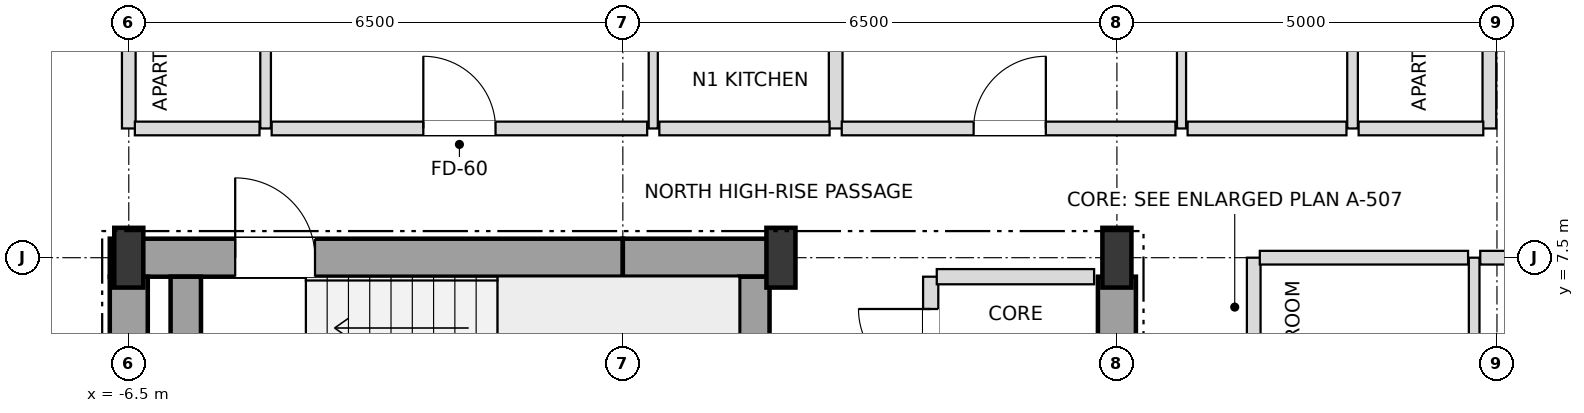
"""IFC4 building model, lengths in metres.
Left out: names, types, materials, properties, quantities, classifications, styles, units other than length and angle.
Written with IfcOpenShell. Run it as: python <this file> out.ifc"""

import sys

from ifc_helpers import new_model, si_unit, direction, frame, frame_2d, origin, origin_2d, place, context, subcontext, project, spatial, rectangle, i_section, extrude, element, fill, save


model = new_model("IFC4")
c1 = context("Model", 3, precision=1e-05, world=origin(), true_north=direction((0.0, 1.0)))
c2 = subcontext(c1, "Body", "Model", "MODEL_VIEW")
j1 = project(units=[si_unit("LENGTHUNIT", "METRE"), si_unit("PLANEANGLEUNIT", "RADIAN")], contexts=[c1])
p1 = place(None, origin())
s1 = spatial("IfcSite", under=j1, at=p1, CompositionType="ELEMENT")
p2 = place(p1, origin())
s2 = spatial("IfcBuilding", under=s1, at=p2, CompositionType="ELEMENT")
p3 = place(p2, frame((0.0, 0.0, 233.1)))
s3 = spatial("IfcBuildingStorey", under=s2, at=p3, CompositionType="ELEMENT", Elevation=233.1)
for number, where, z_axis, x_axis in (
    (1, (-6.5, 7.5, 0.0), (0.0, 0.0, 1.0), (1.0, 0.0, 0.0)),
    (2, (2.08, 7.5, 0.0), (0.0, 0.0, 1.0), (1.0, 0.0, 0.0)),
    (3, (6.5, 7.5, 0.0), (0.0, 0.0, 1.0), (1.0, 0.0, 0.0)),
):
    element("IfcColumn", number, at=place(p3, frame(where, z_axis=z_axis, x_axis=x_axis)), inside=s3, PredefinedType="COLUMN", context=c2, shape_type="SweptSolid", body=[
        extrude(i_section(OverallWidth=0.382, OverallDepth=0.786, WebThickness=0.02, FlangeThickness=0.033, at=origin_2d()), origin(), (0.0, 0.0, 1.0), 3.6),
    ])
p4 = place(p3, frame((-6.75, 7.5, 0.0), z_axis=(0.0, 0.0, 1.0), x_axis=(1.0, 0.0, 0.0)))
e4 = element("IfcWall", 4, at=p4, inside=s3, PredefinedType="SHEAR", context=c2, shape_type="SweptSolid", body=[
    extrude(rectangle(XDim=6.75, YDim=0.5, at=frame_2d((3.375, 0.0))), origin(), (0.0, 0.0, 1.0), 3.38),
])
p5 = place(p4, frame((1.65, 0.0, 0.0)))
e5 = element("IfcOpeningElement", 5, at=p5, cuts=e4, PredefinedType="OPENING", context=c2, shape_type="SweptSolid", body=[
    extrude(rectangle(XDim=1.05, YDim=2.15, at=frame_2d((0.525, 1.075))), frame((0.0, 0.26, 0.0), z_axis=(0.0, -1.0, 0.0), x_axis=(1.0, 0.0, 0.0)), (0.0, 0.0, 1.0), 0.52),
])
p6 = place(p3, frame((0.0, 7.5, 0.0), z_axis=(0.0, 0.0, 1.0), x_axis=(1.0, 0.0, 0.0)))
e6 = element("IfcWall", 6, at=p6, inside=s3, PredefinedType="SHEAR", context=c2, shape_type="SweptSolid", body=[
    extrude(rectangle(XDim=2.08, YDim=0.5, at=frame_2d((1.04, 0.0))), origin(), (0.0, 0.0, 1.0), 3.38),
])
for number, where, z_axis, x_axis in (
    (7, (-6.5, 3.95, 0.0), (0.0, 0.0, 1.0), (0.0, 1.0, 0.0)),
    (8, (6.5, 3.95, 0.0), (0.0, 0.0, 1.0), (0.0, 1.0, 0.0)),
):
    element("IfcWall", number, at=place(p3, frame(where, z_axis=z_axis, x_axis=x_axis)), inside=s3, PredefinedType="SHEAR", context=c2, shape_type="SweptSolid", body=[
        extrude(rectangle(XDim=3.3, YDim=0.5, at=frame_2d((1.65, 0.0))), origin(), (0.0, 0.0, 1.0), 3.38),
    ])
for number, where, z_axis, x_axis in (
    (9, (1.73, 3.95, 0.0), (0.0, 0.0, 1.0), (0.0, 1.0, 0.0)),
    (10, (-5.75, 3.95, 0.0), (0.0, 0.0, 1.0), (0.0, 1.0, 0.0)),
):
    element("IfcWall", number, at=place(p3, frame(where, z_axis=z_axis, x_axis=x_axis)), inside=s3, PredefinedType="SHEAR", context=c2, shape_type="SweptSolid", body=[
        extrude(rectangle(XDim=3.3, YDim=0.4, at=frame_2d((1.65, 0.0))), origin(), (0.0, 0.0, 1.0), 3.38),
    ])
p7 = place(p3, frame((-6.5, 9.2, 0.0), z_axis=(0.0, 0.0, 1.0), x_axis=(0.0, 1.0, 0.0)))
e11 = element("IfcWall", 11, at=p7, inside=s3, PredefinedType="PARTITIONING", context=c2, shape_type="SweptSolid", body=[
    extrude(rectangle(XDim=10.7, YDim=0.18, at=frame_2d((5.35, 0.0))), origin(), (0.0, 0.0, 1.0), 2.826),
])
p8 = place(p3, frame((-4.7, 9.2, 0.0), z_axis=(0.0, 0.0, 1.0), x_axis=(0.0, 1.0, 0.0)))
e12 = element("IfcWall", 12, at=p8, inside=s3, PredefinedType="PARTITIONING", context=c2, shape_type="SweptSolid", body=[
    extrude(rectangle(XDim=4.7, YDim=0.14, at=frame_2d((2.35, 0.0))), origin(), (0.0, 0.0, 1.0), 3.38),
])
p9 = place(p8, frame((1.9, 0.0, 0.0)))
e13 = element("IfcOpeningElement", 13, at=p9, cuts=e12, PredefinedType="OPENING", context=c2, shape_type="SweptSolid", body=[
    extrude(rectangle(XDim=0.9, YDim=2.1, at=frame_2d((0.45, 1.05))), frame((0.0, 0.08, 0.0), z_axis=(0.0, -1.0, 0.0), x_axis=(1.0, 0.0, 0.0)), (0.0, 0.0, 1.0), 0.16),
])
p10 = place(p3, frame((0.4, 9.2, 0.0), z_axis=(0.0, 0.0, 1.0), x_axis=(0.0, 1.0, 0.0)))
e14 = element("IfcWall", 14, at=p10, inside=s3, PredefinedType="PARTITIONING", context=c2, shape_type="SweptSolid", body=[
    extrude(rectangle(XDim=4.7, YDim=0.12, at=frame_2d((2.35, 0.0))), origin(), (0.0, 0.0, 1.0), 3.38),
])
p11 = place(p10, frame((1.875, 0.0, 0.0)))
e15 = element("IfcOpeningElement", 15, at=p11, cuts=e14, PredefinedType="OPENING", context=c2, shape_type="SweptSolid", body=[
    extrude(rectangle(XDim=0.95, YDim=2.1, at=frame_2d((0.475, 1.05))), frame((0.0, 0.07, 0.0), z_axis=(0.0, -1.0, 0.0), x_axis=(1.0, 0.0, 0.0)), (0.0, 0.0, 1.0), 0.14),
])
p12 = place(p3, frame((2.8, 9.2, 0.0), z_axis=(0.0, 0.0, 1.0), x_axis=(0.0, 1.0, 0.0)))
e16 = element("IfcWall", 16, at=p12, inside=s3, PredefinedType="PARTITIONING", context=c2, shape_type="SweptSolid", body=[
    extrude(rectangle(XDim=10.7, YDim=0.18, at=frame_2d((5.35, 0.0))), origin(), (0.0, 0.0, 1.0), 3.018),
])
p13 = place(p3, frame((4.05, 5.55, 0.0), z_axis=(0.0, 0.0, 1.0), x_axis=(0.0, 1.0, 0.0)))
e17 = element("IfcWall", 17, at=p13, inside=s3, PredefinedType="SOLIDWALL", context=c2, shape_type="SweptSolid", body=[
    extrude(rectangle(XDim=1.7, YDim=0.2, at=frame_2d((0.85, 0.0))), origin(), (0.0, 0.0, 1.0), 3.38),
])
p14 = place(p13, frame((0.325, 0.0, 0.0)))
e18 = element("IfcOpeningElement", 18, at=p14, cuts=e17, PredefinedType="OPENING", context=c2, shape_type="SweptSolid", body=[
    extrude(rectangle(XDim=0.95, YDim=2.15, at=frame_2d((0.475, 1.075))), frame((0.0, 0.11, 0.0), z_axis=(0.0, -1.0, 0.0), x_axis=(1.0, 0.0, 0.0)), (0.0, 0.0, 1.0), 0.22),
])
p15 = place(p3, frame((7.35, 9.2, 0.0), z_axis=(0.0, 0.0, 1.0), x_axis=(0.0, 1.0, 0.0)))
e19 = element("IfcWall", 19, at=p15, inside=s3, PredefinedType="PARTITIONING", context=c2, shape_type="SweptSolid", body=[
    extrude(rectangle(XDim=10.7, YDim=0.12, at=frame_2d((5.35, 0.0))), origin(), (0.0, 0.0, 1.0), 2.826),
])
p16 = place(p15, frame((1.875, 0.0, 0.0)))
e20 = element("IfcOpeningElement", 20, at=p16, cuts=e19, PredefinedType="OPENING", context=c2, shape_type="SweptSolid", body=[
    extrude(rectangle(XDim=0.95, YDim=2.1, at=frame_2d((0.475, 1.05))), frame((0.0, 0.07, 0.0), z_axis=(0.0, -1.0, 0.0), x_axis=(1.0, 0.0, 0.0)), (0.0, 0.0, 1.0), 0.14),
])
p17 = place(p15, frame((7.25, 0.0, 0.0)))
e21 = element("IfcOpeningElement", 21, at=p17, cuts=e19, PredefinedType="OPENING", context=c2, shape_type="SweptSolid", body=[
    extrude(rectangle(XDim=0.9, YDim=2.1, at=frame_2d((0.45, 1.05))), frame((0.0, 0.07, 0.0), z_axis=(0.0, -1.0, 0.0), x_axis=(1.0, 0.0, 0.0)), (0.0, 0.0, 1.0), 0.14),
])
p18 = place(p3, frame((8.3, -7.5, 0.0), z_axis=(0.0, 0.0, 1.0), x_axis=(0.0, 1.0, 0.0)))
e22 = element("IfcWall", 22, at=p18, inside=s3, PredefinedType="PARTITIONING", context=c2, shape_type="SweptSolid", body=[
    extrude(rectangle(XDim=15.0, YDim=0.18, at=frame_2d((7.5, 0.0))), origin(), (0.0, 0.0, 1.0), 3.38),
])
p19 = place(p18, frame((2.355, 0.0, 0.0)))
e23 = element("IfcOpeningElement", 23, at=p19, cuts=e22, PredefinedType="OPENING", context=c2, shape_type="SweptSolid", body=[
    extrude(rectangle(XDim=0.95, YDim=2.15, at=frame_2d((0.475, 1.075))), frame((0.0, 0.1, 0.0), z_axis=(0.0, -1.0, 0.0), x_axis=(1.0, 0.0, 0.0)), (0.0, 0.0, 1.0), 0.2),
])
p20 = place(p3, frame((9.6, 9.2, 0.0), z_axis=(0.0, 0.0, 1.0), x_axis=(0.0, 1.0, 0.0)))
e24 = element("IfcWall", 24, at=p20, inside=s3, PredefinedType="PARTITIONING", context=c2, shape_type="SweptSolid", body=[
    extrude(rectangle(XDim=4.7, YDim=0.14, at=frame_2d((2.35, 0.0))), origin(), (0.0, 0.0, 1.0), 2.826),
])
p21 = place(p20, frame((1.9, 0.0, 0.0)))
e25 = element("IfcOpeningElement", 25, at=p21, cuts=e24, PredefinedType="OPENING", context=c2, shape_type="SweptSolid", body=[
    extrude(rectangle(XDim=0.9, YDim=2.1, at=frame_2d((0.45, 1.05))), frame((0.0, 0.08, 0.0), z_axis=(0.0, -1.0, 0.0), x_axis=(1.0, 0.0, 0.0)), (0.0, 0.0, 1.0), 0.16),
])
p22 = place(p3, frame((11.2, -7.5, 0.0), z_axis=(0.0, 0.0, 1.0), x_axis=(0.0, 1.0, 0.0)))
e26 = element("IfcWall", 26, at=p22, inside=s3, PredefinedType="PARTITIONING", context=c2, shape_type="SweptSolid", body=[
    extrude(rectangle(XDim=15.0, YDim=0.14, at=frame_2d((7.5, 0.0))), origin(), (0.0, 0.0, 1.0), 3.38),
])
p23 = place(p22, frame((3.475, 0.0, 0.0)))
e27 = element("IfcOpeningElement", 27, at=p23, cuts=e26, PredefinedType="OPENING", context=c2, shape_type="SweptSolid", body=[
    extrude(rectangle(XDim=0.95, YDim=2.1, at=frame_2d((0.475, 1.05))), frame((0.0, 0.08, 0.0), z_axis=(0.0, -1.0, 0.0), x_axis=(1.0, 0.0, 0.0)), (0.0, 0.0, 1.0), 0.16),
])
p24 = place(p3, frame((11.4, 9.2, 0.0), z_axis=(0.0, 0.0, 1.0), x_axis=(0.0, 1.0, 0.0)))
e28 = element("IfcWall", 28, at=p24, inside=s3, PredefinedType="PARTITIONING", context=c2, shape_type="SweptSolid", body=[
    extrude(rectangle(XDim=5.07, YDim=0.18, at=frame_2d((2.535, 0.0))), origin(), (0.0, 0.0, 1.0), 2.748),
])
p25 = place(p3, frame((4.13, 7.25, 0.0), z_axis=(0.0, 0.0, 1.0), x_axis=(1.0, 0.0, 0.0)))
e29 = element("IfcWall", 29, at=p25, inside=s3, PredefinedType="SOLIDWALL", context=c2, shape_type="SweptSolid", body=[
    extrude(rectangle(XDim=2.07, YDim=0.2, at=frame_2d((1.035, 0.0))), origin(), (0.0, 0.0, 1.0), 3.38),
])
p26 = place(p3, frame((8.38, 7.5, 0.0), z_axis=(0.0, 0.0, 1.0), x_axis=(1.0, 0.0, 0.0)))
e30 = element("IfcWall", 30, at=p26, inside=s3, PredefinedType="PARTITIONING", context=c2, shape_type="SweptSolid", body=[
    extrude(rectangle(XDim=2.74, YDim=0.18, at=frame_2d((1.37, 0.0))), origin(), (0.0, 0.0, 1.0), 2.826),
])
p27 = place(p3, frame((11.28, 7.5, 0.0), z_axis=(0.0, 0.0, 1.0), x_axis=(1.0, 0.0, 0.0)))
e31 = element("IfcWall", 31, at=p27, inside=s3, PredefinedType="PARTITIONING", context=c2, shape_type="SweptSolid", body=[
    extrude(rectangle(XDim=5.62, YDim=0.18, at=frame_2d((2.81, 0.0))), origin(), (0.0, 0.0, 1.0), 2.826),
])
p28 = place(p3, frame((-6.42, 9.2, 0.0), z_axis=(0.0, 0.0, 1.0), x_axis=(1.0, 0.0, 0.0)))
e32 = element("IfcWall", 32, at=p28, inside=s3, PredefinedType="PARTITIONING", context=c2, shape_type="SweptSolid", body=[
    extrude(rectangle(XDim=1.64, YDim=0.18, at=frame_2d((0.82, 0.0))), origin(), (0.0, 0.0, 1.0), 3.38),
])
p29 = place(p3, frame((-4.62, 9.2, 0.0), z_axis=(0.0, 0.0, 1.0), x_axis=(1.0, 0.0, 0.0)))
e33 = element("IfcWall", 33, at=p29, inside=s3, PredefinedType="PARTITIONING", context=c2, shape_type="SweptSolid", body=[
    extrude(rectangle(XDim=4.94, YDim=0.18, at=frame_2d((2.47, 0.0))), origin(), (0.0, 0.0, 1.0), 3.38),
])
p30 = place(p29, frame((1.995, 0.0, 0.0)))
e34 = element("IfcOpeningElement", 34, at=p30, cuts=e33, PredefinedType="OPENING", context=c2, shape_type="SweptSolid", body=[
    extrude(rectangle(XDim=0.95, YDim=2.15, at=frame_2d((0.475, 1.075))), frame((0.0, 0.1, 0.0), z_axis=(0.0, -1.0, 0.0), x_axis=(1.0, 0.0, 0.0)), (0.0, 0.0, 1.0), 0.2),
])
p31 = place(p3, frame((0.48, 9.2, 0.0), z_axis=(0.0, 0.0, 1.0), x_axis=(1.0, 0.0, 0.0)))
e35 = element("IfcWall", 35, at=p31, inside=s3, PredefinedType="PARTITIONING", context=c2, shape_type="SweptSolid", body=[
    extrude(rectangle(XDim=2.24, YDim=0.18, at=frame_2d((1.12, 0.0))), origin(), (0.0, 0.0, 1.0), 3.38),
])
p32 = place(p3, frame((2.88, 9.2, 0.0), z_axis=(0.0, 0.0, 1.0), x_axis=(1.0, 0.0, 0.0)))
e36 = element("IfcWall", 36, at=p32, inside=s3, PredefinedType="PARTITIONING", context=c2, shape_type="SweptSolid", body=[
    extrude(rectangle(XDim=4.39, YDim=0.18, at=frame_2d((2.195, 0.0))), origin(), (0.0, 0.0, 1.0), 2.826),
])
p33 = place(p32, frame((1.735, 0.0, 0.0)))
e37 = element("IfcOpeningElement", 37, at=p33, cuts=e36, PredefinedType="OPENING", context=c2, shape_type="SweptSolid", body=[
    extrude(rectangle(XDim=0.95, YDim=2.15, at=frame_2d((0.475, 1.075))), frame((0.0, 0.1, 0.0), z_axis=(0.0, -1.0, 0.0), x_axis=(1.0, 0.0, 0.0)), (0.0, 0.0, 1.0), 0.2),
])
p34 = place(p3, frame((7.43, 9.2, 0.0), z_axis=(0.0, 0.0, 1.0), x_axis=(1.0, 0.0, 0.0)))
e38 = element("IfcWall", 38, at=p34, inside=s3, PredefinedType="PARTITIONING", context=c2, shape_type="SweptSolid", body=[
    extrude(rectangle(XDim=2.09, YDim=0.18, at=frame_2d((1.045, 0.0))), origin(), (0.0, 0.0, 1.0), 3.38),
])
p35 = place(p3, frame((9.68, 9.2, 0.0), z_axis=(0.0, 0.0, 1.0), x_axis=(1.0, 0.0, 0.0)))
e39 = element("IfcWall", 39, at=p35, inside=s3, PredefinedType="PARTITIONING", context=c2, shape_type="SweptSolid", body=[
    extrude(rectangle(XDim=1.64, YDim=0.18, at=frame_2d((0.82, 0.0))), origin(), (0.0, 0.0, 1.0), 3.38),
])
p36 = place(p5, origin())
e40 = element("IfcDoor", 40, at=p36, inside=s3, OperationType="SINGLE_SWING_LEFT", PredefinedType="DOOR", context=c2, shape_type="SweptSolid", body=[
    extrude(rectangle(XDim=1.05, YDim=2.15, at=frame_2d((0.525, 1.075))), frame((0.0, 0.025, 0.0), z_axis=(0.0, -1.0, 0.0), x_axis=(1.0, 0.0, 0.0)), (0.0, 0.0, 1.0), 0.05),
])
fill(e5, e40)
p37 = place(p14, origin())
e41 = element("IfcDoor", 41, at=p37, inside=s3, OperationType="SINGLE_SWING_RIGHT", PredefinedType="DOOR", context=c2, shape_type="SweptSolid", body=[
    extrude(rectangle(XDim=0.95, YDim=2.15, at=frame_2d((0.475, 1.075))), frame((0.0, 0.025, 0.0), z_axis=(0.0, -1.0, 0.0), x_axis=(1.0, 0.0, 0.0)), (0.0, 0.0, 1.0), 0.05),
])
fill(e18, e41)
p38 = place(p30, origin())
e42 = element("IfcDoor", 42, at=p38, inside=s3, OperationType="SINGLE_SWING_LEFT", PredefinedType="DOOR", context=c2, shape_type="SweptSolid", body=[
    extrude(rectangle(XDim=0.95, YDim=2.15, at=frame_2d((0.475, 1.075))), frame((0.0, 0.025, 0.0), z_axis=(0.0, -1.0, 0.0), x_axis=(1.0, 0.0, 0.0)), (0.0, 0.0, 1.0), 0.05),
])
fill(e34, e42)
p39 = place(p33, origin())
e43 = element("IfcDoor", 43, at=p39, inside=s3, OperationType="SINGLE_SWING_RIGHT", PredefinedType="DOOR", context=c2, shape_type="SweptSolid", body=[
    extrude(rectangle(XDim=0.95, YDim=2.15, at=frame_2d((0.475, 1.075))), frame((0.0, 0.025, 0.0), z_axis=(0.0, -1.0, 0.0), x_axis=(1.0, 0.0, 0.0)), (0.0, 0.0, 1.0), 0.05),
])
fill(e37, e43)
save(model, sys.argv[1])
